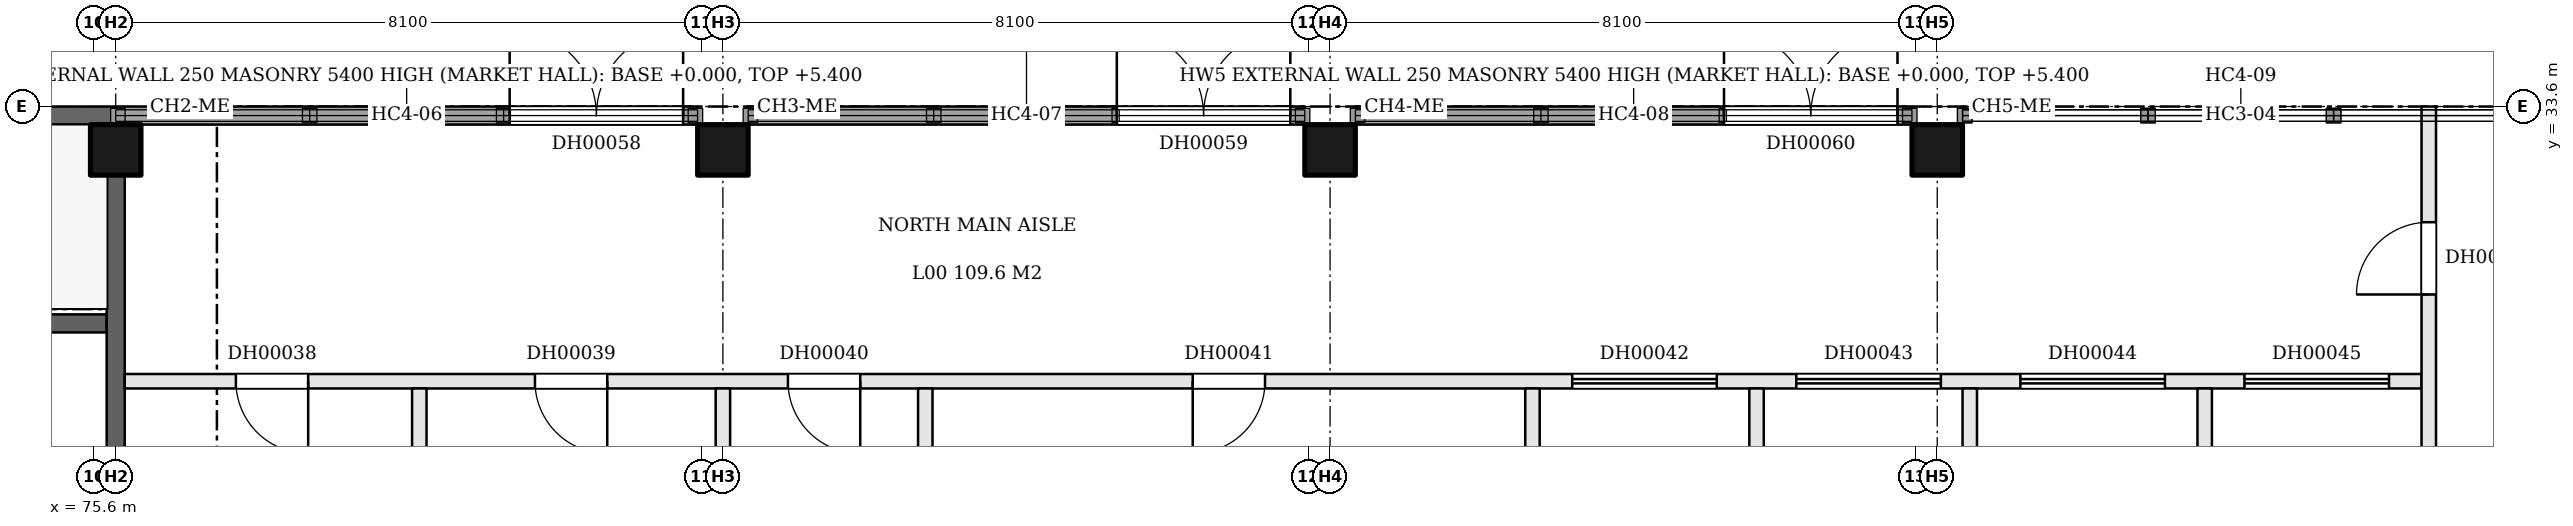
"""IFC4 building model, lengths in metres.
Left out: names, types, materials, properties, quantities, classifications, styles, units other than length and angle.
Written with IfcOpenShell. Run it as: python <this file> out.ifc"""

import sys

from ifc_helpers import new_model, si_unit, direction, frame, frame_2d, origin, origin_2d, place, context, subcontext, project, spatial, rectangle, extrude, element, fill, save


model = new_model("IFC4")
c1 = context("Model", 3, precision=1e-05, world=origin(), true_north=direction((0.0, 1.0)))
c2 = subcontext(c1, "Body", "Model", "MODEL_VIEW")
j1 = project(units=[si_unit("LENGTHUNIT", "METRE"), si_unit("PLANEANGLEUNIT", "RADIAN")], contexts=[c1])
p1 = place(None, origin())
s1 = spatial("IfcSite", under=j1, at=p1, CompositionType="ELEMENT")
p2 = place(p1, origin())
s2 = spatial("IfcBuilding", under=s1, at=p2, CompositionType="ELEMENT")
p3 = place(p2, origin())
s3 = spatial("IfcBuildingStorey", under=s2, at=p3, CompositionType="ELEMENT", Elevation=0.0)
p4 = place(p3, frame((75.9, 33.0, 0.0), z_axis=(0.0, 0.0, 1.0), x_axis=(1.0, 0.0, 0.0)))
e1 = element("IfcColumn", 1, at=p4, inside=s3, PredefinedType="COLUMN", context=c2, shape_type="SweptSolid", body=[
    extrude(rectangle(XDim=0.7, YDim=0.7, at=origin_2d()), origin(), (0.0, 0.0, 1.0), 8.7),
])
for number, where, z_axis, x_axis in (
    (2, (84.3, 33.0, -0.2), (0.0, 0.0, 1.0), (1.0, 0.0, 0.0)),
    (3, (92.7, 33.0, -0.2), (0.0, 0.0, 1.0), (1.0, 0.0, 0.0)),
    (4, (101.1, 33.0, -0.2), (0.0, 0.0, 1.0), (1.0, 0.0, 0.0)),
):
    element("IfcColumn", number, at=place(p3, frame(where, z_axis=z_axis, x_axis=x_axis)), inside=s3, PredefinedType="COLUMN", context=c2, shape_type="SweptSolid", body=[
        extrude(rectangle(XDim=0.7, YDim=0.7, at=origin_2d()), origin(), (0.0, 0.0, 1.0), 8.9),
    ])
p5 = place(p3, frame((76.025, 29.8, 0.0), z_axis=(0.0, 0.0, 1.0), x_axis=(1.0, 0.0, 0.0)))
e5 = element("IfcWall", 5, at=p5, inside=s3, PredefinedType="PARTITIONING", context=c2, shape_type="SweptSolid", body=[
    extrude(rectangle(XDim=31.775, YDim=0.2, at=frame_2d((15.888, 0.0))), origin(), (0.0, 0.0, 1.0), 8.7),
])
p6 = place(p5, frame((1.538, 0.0, 0.0)))
e6 = element("IfcOpeningElement", 6, at=p6, cuts=e5, PredefinedType="OPENING", context=c2, shape_type="SweptSolid", body=[
    extrude(rectangle(XDim=1.0, YDim=2.1, at=frame_2d((0.5, 1.05))), frame((0.0, 0.11, 0.0), z_axis=(0.0, -1.0, 0.0), x_axis=(1.0, 0.0, 0.0)), (0.0, 0.0, 1.0), 0.22),
])
p7 = place(p5, frame((5.675, 0.0, 0.0)))
e7 = element("IfcOpeningElement", 7, at=p7, cuts=e5, PredefinedType="OPENING", context=c2, shape_type="SweptSolid", body=[
    extrude(rectangle(XDim=1.0, YDim=2.1, at=frame_2d((0.5, 1.05))), frame((0.0, 0.11, 0.0), z_axis=(0.0, -1.0, 0.0), x_axis=(1.0, 0.0, 0.0)), (0.0, 0.0, 1.0), 0.22),
])
p8 = place(p5, frame((9.175, 0.0, 0.0)))
e8 = element("IfcOpeningElement", 8, at=p8, cuts=e5, PredefinedType="OPENING", context=c2, shape_type="SweptSolid", body=[
    extrude(rectangle(XDim=1.0, YDim=2.1, at=frame_2d((0.5, 1.05))), frame((0.0, 0.11, 0.0), z_axis=(0.0, -1.0, 0.0), x_axis=(1.0, 0.0, 0.0)), (0.0, 0.0, 1.0), 0.22),
])
p9 = place(p5, frame((14.775, 0.0, 0.0)))
e9 = element("IfcOpeningElement", 9, at=p9, cuts=e5, PredefinedType="OPENING", context=c2, shape_type="SweptSolid", body=[
    extrude(rectangle(XDim=1.0, YDim=2.1, at=frame_2d((0.5, 1.05))), frame((0.0, 0.11, 0.0), z_axis=(0.0, -1.0, 0.0), x_axis=(1.0, 0.0, 0.0)), (0.0, 0.0, 1.0), 0.22),
])
p10 = place(p5, frame((20.025, 0.0, 0.0)))
e10 = element("IfcOpeningElement", 10, at=p10, cuts=e5, PredefinedType="OPENING", context=c2, shape_type="SweptSolid", body=[
    extrude(rectangle(XDim=2.0, YDim=2.4, at=frame_2d((1.0, 1.2))), frame((0.0, 0.11, 0.0), z_axis=(0.0, -1.0, 0.0), x_axis=(1.0, 0.0, 0.0)), (0.0, 0.0, 1.0), 0.22),
])
p11 = place(p5, frame((23.125, 0.0, 0.0)))
e11 = element("IfcOpeningElement", 11, at=p11, cuts=e5, PredefinedType="OPENING", context=c2, shape_type="SweptSolid", body=[
    extrude(rectangle(XDim=2.0, YDim=2.4, at=frame_2d((1.0, 1.2))), frame((0.0, 0.11, 0.0), z_axis=(0.0, -1.0, 0.0), x_axis=(1.0, 0.0, 0.0)), (0.0, 0.0, 1.0), 0.22),
])
p12 = place(p5, frame((26.225, 0.0, 0.0)))
e12 = element("IfcOpeningElement", 12, at=p12, cuts=e5, PredefinedType="OPENING", context=c2, shape_type="SweptSolid", body=[
    extrude(rectangle(XDim=2.0, YDim=2.4, at=frame_2d((1.0, 1.2))), frame((0.0, 0.11, 0.0), z_axis=(0.0, -1.0, 0.0), x_axis=(1.0, 0.0, 0.0)), (0.0, 0.0, 1.0), 0.22),
])
p13 = place(p5, frame((29.325, 0.0, 0.0)))
e13 = element("IfcOpeningElement", 13, at=p13, cuts=e5, PredefinedType="OPENING", context=c2, shape_type="SweptSolid", body=[
    extrude(rectangle(XDim=2.0, YDim=2.4, at=frame_2d((1.0, 1.2))), frame((0.0, 0.11, 0.0), z_axis=(0.0, -1.0, 0.0), x_axis=(1.0, 0.0, 0.0)), (0.0, 0.0, 1.0), 0.22),
])
p14 = place(p3, frame((67.75, 30.6, 0.0), z_axis=(0.0, 0.0, 1.0), x_axis=(1.0, 0.0, 0.0)))
e14 = element("IfcWall", 14, at=p14, inside=s3, PredefinedType="SHEAR", context=c2, shape_type="SweptSolid", body=[
    extrude(rectangle(XDim=8.025, YDim=0.25, at=frame_2d((4.012, 0.0))), origin(), (0.0, 0.0, 1.0), 8.7),
])
p15 = place(p14, frame((0.2, 0.0, 0.0)))
e15 = element("IfcOpeningElement", 15, at=p15, cuts=e14, PredefinedType="OPENING", context=c2, shape_type="SweptSolid", body=[
    extrude(rectangle(XDim=1.0, YDim=2.1, at=frame_2d((0.5, 1.05))), frame((0.0, 0.135, 0.0), z_axis=(0.0, -1.0, 0.0), x_axis=(1.0, 0.0, 0.0)), (0.0, 0.0, 1.0), 0.27),
])
p16 = place(p3, frame((67.75, 33.475, 0.0), z_axis=(0.0, 0.0, 1.0), x_axis=(1.0, 0.0, 0.0)))
e16 = element("IfcWall", 16, at=p16, inside=s3, PredefinedType="SHEAR", context=c2, shape_type="SweptSolid", body=[
    extrude(rectangle(XDim=8.15, YDim=0.25, at=frame_2d((4.075, 0.0))), origin(), (0.0, 0.0, 1.0), 8.7),
])
p17 = place(p16, frame((0.85, 0.0, 0.0)))
e17 = element("IfcOpeningElement", 17, at=p17, cuts=e16, PredefinedType="OPENING", context=c2, shape_type="SweptSolid", body=[
    extrude(rectangle(XDim=1.8, YDim=2.1, at=frame_2d((0.9, 1.05))), frame((0.0, 0.135, 0.0), z_axis=(0.0, -1.0, 0.0), x_axis=(1.0, 0.0, 0.0)), (0.0, 0.0, 1.0), 0.27),
])
p18 = place(p3, frame((75.9, 33.475, 0.0), z_axis=(0.0, 0.0, 1.0), x_axis=(1.0, 0.0, 0.0)))
e18 = element("IfcWall", 18, at=p18, inside=s3, PredefinedType="SOLIDWALL", context=c2, shape_type="SweptSolid", body=[
    extrude(rectangle(XDim=8.05, YDim=0.25, at=frame_2d((4.025, 0.0))), origin(), (0.0, 0.0, 1.0), 5.4),
])
p19 = place(p18, frame((5.45, 0.0, 0.0)))
e19 = element("IfcOpeningElement", 19, at=p19, cuts=e18, PredefinedType="OPENING", context=c2, shape_type="SweptSolid", body=[
    extrude(rectangle(XDim=2.4, YDim=2.4, at=frame_2d((1.2, 1.2))), frame((0.0, 0.135, 0.0), z_axis=(0.0, -1.0, 0.0), x_axis=(1.0, 0.0, 0.0)), (0.0, 0.0, 1.0), 0.27),
])
p20 = place(p3, frame((84.65, 33.475, 0.0), z_axis=(0.0, 0.0, 1.0), x_axis=(1.0, 0.0, 0.0)))
e20 = element("IfcWall", 20, at=p20, inside=s3, PredefinedType="SOLIDWALL", context=c2, shape_type="SweptSolid", body=[
    extrude(rectangle(XDim=7.7, YDim=0.25, at=frame_2d((3.85, 0.0))), origin(), (0.0, 0.0, 1.0), 5.4),
])
p21 = place(p20, frame((5.1, 0.0, 0.0)))
e21 = element("IfcOpeningElement", 21, at=p21, cuts=e20, PredefinedType="OPENING", context=c2, shape_type="SweptSolid", body=[
    extrude(rectangle(XDim=2.4, YDim=2.4, at=frame_2d((1.2, 1.2))), frame((0.0, 0.135, 0.0), z_axis=(0.0, -1.0, 0.0), x_axis=(1.0, 0.0, 0.0)), (0.0, 0.0, 1.0), 0.27),
])
p22 = place(p3, frame((93.05, 33.475, 0.0), z_axis=(0.0, 0.0, 1.0), x_axis=(1.0, 0.0, 0.0)))
e22 = element("IfcWall", 22, at=p22, inside=s3, PredefinedType="SOLIDWALL", context=c2, shape_type="SweptSolid", body=[
    extrude(rectangle(XDim=7.7, YDim=0.25, at=frame_2d((3.85, 0.0))), origin(), (0.0, 0.0, 1.0), 5.4),
])
p23 = place(p22, frame((5.1, 0.0, 0.0)))
e23 = element("IfcOpeningElement", 23, at=p23, cuts=e22, PredefinedType="OPENING", context=c2, shape_type="SweptSolid", body=[
    extrude(rectangle(XDim=2.4, YDim=2.4, at=frame_2d((1.2, 1.2))), frame((0.0, 0.135, 0.0), z_axis=(0.0, -1.0, 0.0), x_axis=(1.0, 0.0, 0.0)), (0.0, 0.0, 1.0), 0.27),
])
p24 = place(p3, frame((75.9, 25.55, 0.0), z_axis=(0.0, 0.0, 1.0), x_axis=(0.0, 1.0, 0.0)))
e24 = element("IfcWall", 24, at=p24, inside=s3, PredefinedType="SHEAR", context=c2, shape_type="SweptSolid", body=[
    extrude(rectangle(XDim=7.1, YDim=0.25, at=frame_2d((3.55, 0.0))), origin(), (0.0, 0.0, 1.0), 8.7),
])
p25 = place(p3, frame((80.1, 25.3, 0.0), z_axis=(0.0, 0.0, 1.0), x_axis=(0.0, 1.0, 0.0)))
e25 = element("IfcWall", 25, at=p25, inside=s3, PredefinedType="PARTITIONING", context=c2, shape_type="SweptSolid", body=[
    extrude(rectangle(XDim=4.4, YDim=0.2, at=frame_2d((2.2, 0.0))), origin(), (0.0, 0.0, 1.0), 8.7),
])
p26 = place(p3, frame((84.3, 25.55, 0.0), z_axis=(0.0, 0.0, 1.0), x_axis=(0.0, 1.0, 0.0)))
e26 = element("IfcWall", 26, at=p26, inside=s3, PredefinedType="PARTITIONING", context=c2, shape_type="SweptSolid", body=[
    extrude(rectangle(XDim=4.15, YDim=0.2, at=frame_2d((2.075, 0.0))), origin(), (0.0, 0.0, 1.0), 8.7),
])
for number, where, z_axis, x_axis in (
    (27, (87.1, 25.3, 0.0), (0.0, 0.0, 1.0), (0.0, 1.0, 0.0)),
    (28, (95.5, 25.3, 0.0), (0.0, 0.0, 1.0), (0.0, 1.0, 0.0)),
    (29, (98.6, 25.3, 0.0), (0.0, 0.0, 1.0), (0.0, 1.0, 0.0)),
    (30, (101.55, 25.3, 0.0), (0.0, 0.0, 1.0), (0.0, 1.0, 0.0)),
    (31, (104.8, 25.3, 0.0), (0.0, 0.0, 1.0), (0.0, 1.0, 0.0)),
):
    element("IfcWall", number, at=place(p3, frame(where, z_axis=z_axis, x_axis=x_axis)), inside=s3, PredefinedType="PARTITIONING", context=c2, shape_type="SweptSolid", body=[
        extrude(rectangle(XDim=4.4, YDim=0.2, at=frame_2d((2.2, 0.0))), origin(), (0.0, 0.0, 1.0), 8.7),
    ])
p27 = place(p3, frame((107.9, 8.5, 0.0), z_axis=(0.0, 0.0, 1.0), x_axis=(0.0, 1.0, 0.0)))
e32 = element("IfcWall", 32, at=p27, inside=s3, PredefinedType="PARTITIONING", context=c2, shape_type="SweptSolid", body=[
    extrude(rectangle(XDim=25.1, YDim=0.2, at=frame_2d((12.55, 0.0))), origin(), (0.0, 0.0, 1.0), 8.7),
])
p28 = place(p27, frame((3.8, 0.0, 0.0)))
e33 = element("IfcOpeningElement", 33, at=p28, cuts=e32, PredefinedType="OPENING", context=c2, shape_type="SweptSolid", body=[
    extrude(rectangle(XDim=1.0, YDim=2.1, at=frame_2d((0.5, 1.05))), frame((0.0, 0.11, 0.0), z_axis=(0.0, -1.0, 0.0), x_axis=(1.0, 0.0, 0.0)), (0.0, 0.0, 1.0), 0.22),
])
p29 = place(p27, frame((10.0, 0.0, 0.0)))
e34 = element("IfcOpeningElement", 34, at=p29, cuts=e32, PredefinedType="OPENING", context=c2, shape_type="SweptSolid", body=[
    extrude(rectangle(XDim=1.0, YDim=2.1, at=frame_2d((0.5, 1.05))), frame((0.0, 0.11, 0.0), z_axis=(0.0, -1.0, 0.0), x_axis=(1.0, 0.0, 0.0)), (0.0, 0.0, 1.0), 0.22),
])
p30 = place(p27, frame((22.5, 0.0, 0.0)))
e35 = element("IfcOpeningElement", 35, at=p30, cuts=e32, PredefinedType="OPENING", context=c2, shape_type="SweptSolid", body=[
    extrude(rectangle(XDim=1.0, YDim=2.1, at=frame_2d((0.5, 1.05))), frame((0.0, 0.11, 0.0), z_axis=(0.0, -1.0, 0.0), x_axis=(1.0, 0.0, 0.0)), (0.0, 0.0, 1.0), 0.22),
])
p31 = place(p6, frame((1.0, 0.0, 0.0), z_axis=(0.0, 0.0, 1.0), x_axis=(-1.0, 0.0, 0.0)))
e36 = element("IfcDoor", 36, at=p31, inside=s3, OperationType="SINGLE_SWING_LEFT", PredefinedType="DOOR", context=c2, shape_type="SweptSolid", body=[
    extrude(rectangle(XDim=1.0, YDim=2.1, at=frame_2d((0.5, 1.05))), frame((0.0, 0.025, 0.0), z_axis=(0.0, -1.0, 0.0), x_axis=(1.0, 0.0, 0.0)), (0.0, 0.0, 1.0), 0.05),
])
fill(e6, e36)
p32 = place(p7, frame((1.0, 0.0, 0.0), z_axis=(0.0, 0.0, 1.0), x_axis=(-1.0, 0.0, 0.0)))
e37 = element("IfcDoor", 37, at=p32, inside=s3, OperationType="SINGLE_SWING_LEFT", PredefinedType="DOOR", context=c2, shape_type="SweptSolid", body=[
    extrude(rectangle(XDim=1.0, YDim=2.1, at=frame_2d((0.5, 1.05))), frame((0.0, 0.025, 0.0), z_axis=(0.0, -1.0, 0.0), x_axis=(1.0, 0.0, 0.0)), (0.0, 0.0, 1.0), 0.05),
])
fill(e7, e37)
p33 = place(p8, frame((1.0, 0.0, 0.0), z_axis=(0.0, 0.0, 1.0), x_axis=(-1.0, 0.0, 0.0)))
e38 = element("IfcDoor", 38, at=p33, inside=s3, OperationType="SINGLE_SWING_LEFT", PredefinedType="DOOR", context=c2, shape_type="SweptSolid", body=[
    extrude(rectangle(XDim=1.0, YDim=2.1, at=frame_2d((0.5, 1.05))), frame((0.0, 0.025, 0.0), z_axis=(0.0, -1.0, 0.0), x_axis=(1.0, 0.0, 0.0)), (0.0, 0.0, 1.0), 0.05),
])
fill(e8, e38)
p34 = place(p9, frame((1.0, 0.0, 0.0), z_axis=(0.0, 0.0, 1.0), x_axis=(-1.0, 0.0, 0.0)))
e39 = element("IfcDoor", 39, at=p34, inside=s3, OperationType="SINGLE_SWING_RIGHT", PredefinedType="DOOR", context=c2, shape_type="SweptSolid", body=[
    extrude(rectangle(XDim=1.0, YDim=2.1, at=frame_2d((0.5, 1.05))), frame((0.0, 0.025, 0.0), z_axis=(0.0, -1.0, 0.0), x_axis=(1.0, 0.0, 0.0)), (0.0, 0.0, 1.0), 0.05),
])
fill(e9, e39)
p35 = place(p10, origin())
e40 = element("IfcDoor", 40, at=p35, inside=s3, OperationType="ROLLINGUP", PredefinedType="DOOR", context=c2, shape_type="SweptSolid", body=[
    extrude(rectangle(XDim=2.0, YDim=2.4, at=frame_2d((1.0, 1.2))), frame((0.0, 0.025, 0.0), z_axis=(0.0, -1.0, 0.0), x_axis=(1.0, 0.0, 0.0)), (0.0, 0.0, 1.0), 0.05),
])
fill(e10, e40)
p36 = place(p11, origin())
e41 = element("IfcDoor", 41, at=p36, inside=s3, OperationType="ROLLINGUP", PredefinedType="DOOR", context=c2, shape_type="SweptSolid", body=[
    extrude(rectangle(XDim=2.0, YDim=2.4, at=frame_2d((1.0, 1.2))), frame((0.0, 0.025, 0.0), z_axis=(0.0, -1.0, 0.0), x_axis=(1.0, 0.0, 0.0)), (0.0, 0.0, 1.0), 0.05),
])
fill(e11, e41)
p37 = place(p12, origin())
e42 = element("IfcDoor", 42, at=p37, inside=s3, OperationType="ROLLINGUP", PredefinedType="DOOR", context=c2, shape_type="SweptSolid", body=[
    extrude(rectangle(XDim=2.0, YDim=2.4, at=frame_2d((1.0, 1.2))), frame((0.0, 0.025, 0.0), z_axis=(0.0, -1.0, 0.0), x_axis=(1.0, 0.0, 0.0)), (0.0, 0.0, 1.0), 0.05),
])
fill(e12, e42)
p38 = place(p13, origin())
e43 = element("IfcDoor", 43, at=p38, inside=s3, OperationType="ROLLINGUP", PredefinedType="DOOR", context=c2, shape_type="SweptSolid", body=[
    extrude(rectangle(XDim=2.0, YDim=2.4, at=frame_2d((1.0, 1.2))), frame((0.0, 0.025, 0.0), z_axis=(0.0, -1.0, 0.0), x_axis=(1.0, 0.0, 0.0)), (0.0, 0.0, 1.0), 0.05),
])
fill(e13, e43)
p39 = place(p30, origin())
e44 = element("IfcDoor", 44, at=p39, inside=s3, OperationType="SINGLE_SWING_LEFT", PredefinedType="DOOR", context=c2, shape_type="SweptSolid", body=[
    extrude(rectangle(XDim=1.0, YDim=2.1, at=frame_2d((0.5, 1.05))), frame((0.0, 0.025, 0.0), z_axis=(0.0, -1.0, 0.0), x_axis=(1.0, 0.0, 0.0)), (0.0, 0.0, 1.0), 0.05),
])
fill(e35, e44)
p40 = place(p19, origin())
e45 = element("IfcDoor", 45, at=p40, inside=s3, OperationType="DOUBLE_DOOR_SINGLE_SWING", PredefinedType="DOOR", context=c2, shape_type="SweptSolid", body=[
    extrude(rectangle(XDim=2.4, YDim=2.4, at=frame_2d((1.2, 1.2))), frame((0.0, 0.025, 0.0), z_axis=(0.0, -1.0, 0.0), x_axis=(1.0, 0.0, 0.0)), (0.0, 0.0, 1.0), 0.05),
])
fill(e19, e45)
p41 = place(p21, origin())
e46 = element("IfcDoor", 46, at=p41, inside=s3, OperationType="DOUBLE_DOOR_SINGLE_SWING", PredefinedType="DOOR", context=c2, shape_type="SweptSolid", body=[
    extrude(rectangle(XDim=2.4, YDim=2.4, at=frame_2d((1.2, 1.2))), frame((0.0, 0.025, 0.0), z_axis=(0.0, -1.0, 0.0), x_axis=(1.0, 0.0, 0.0)), (0.0, 0.0, 1.0), 0.05),
])
fill(e21, e46)
p42 = place(p23, origin())
e47 = element("IfcDoor", 47, at=p42, inside=s3, OperationType="DOUBLE_DOOR_SINGLE_SWING", PredefinedType="DOOR", context=c2, shape_type="SweptSolid", body=[
    extrude(rectangle(XDim=2.4, YDim=2.4, at=frame_2d((1.2, 1.2))), frame((0.0, 0.025, 0.0), z_axis=(0.0, -1.0, 0.0), x_axis=(1.0, 0.0, 0.0)), (0.0, 0.0, 1.0), 0.05),
])
fill(e23, e47)
save(model, sys.argv[1])
